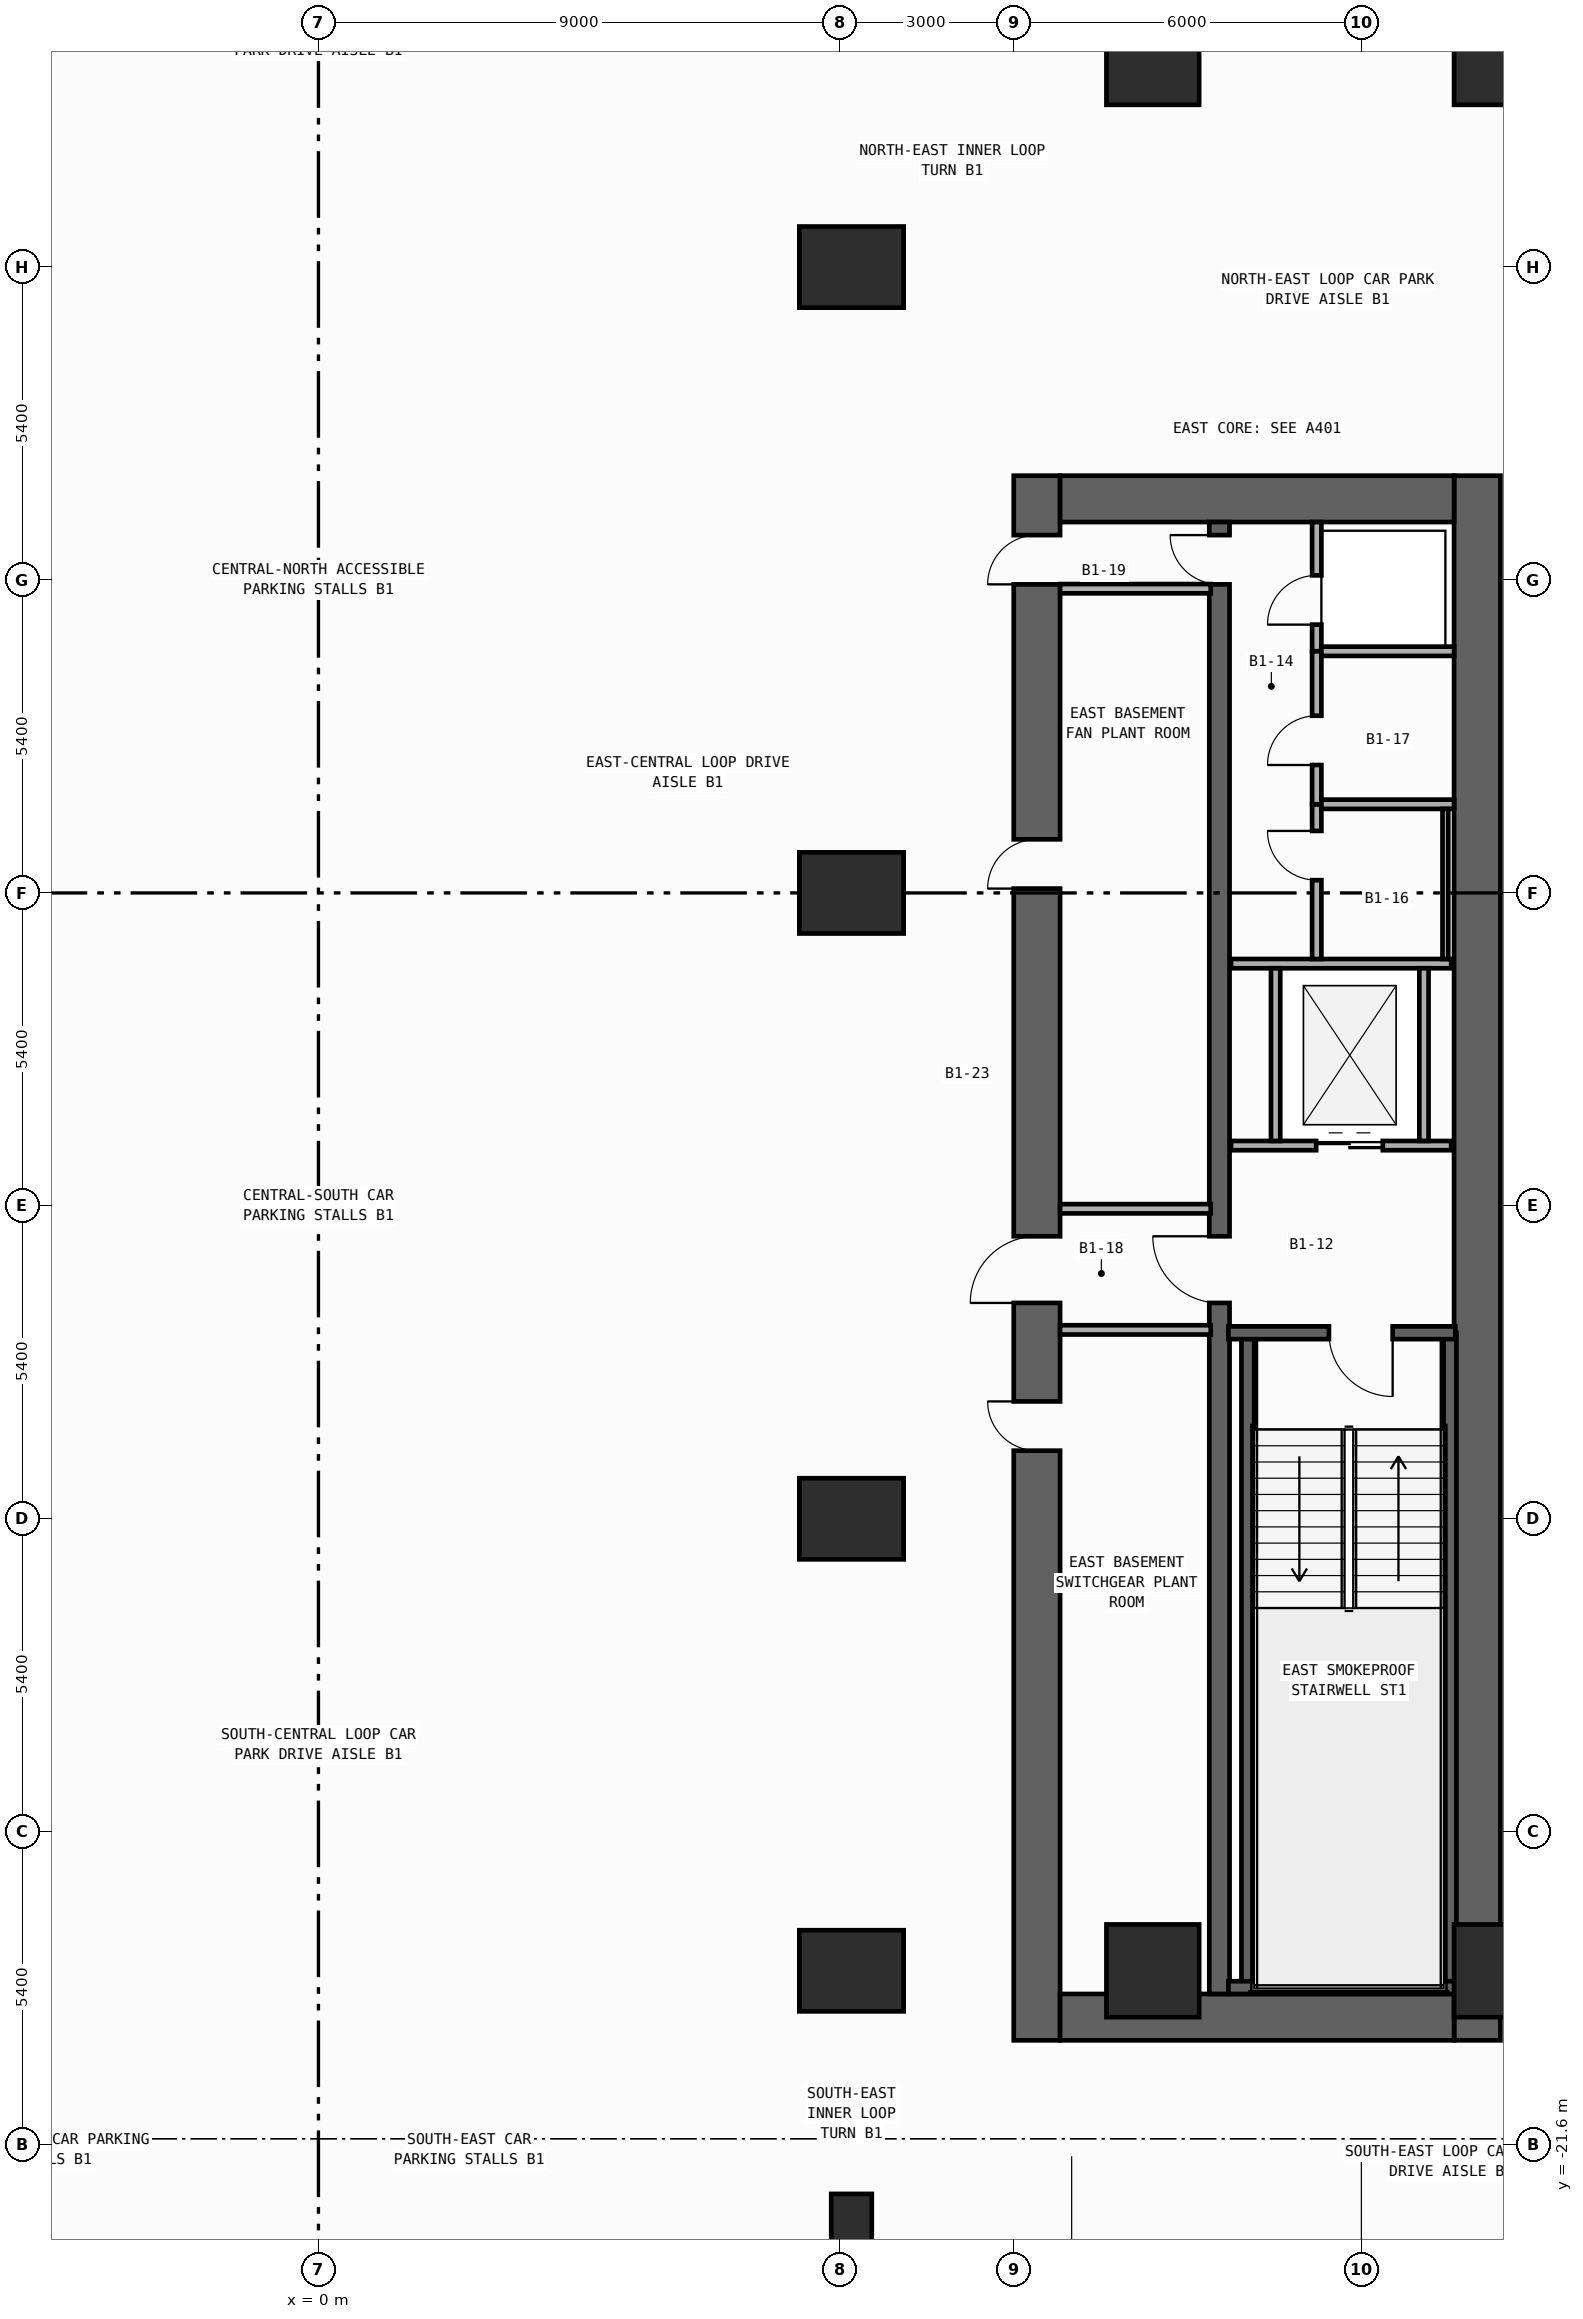
"""IFC4 building model, lengths in metres.
Left out: names, types, materials, properties, quantities, classifications, styles, units other than length and angle.
Written with IfcOpenShell. Run it as: python <this file> out.ifc"""

import sys

from ifc_helpers import new_model, si_unit, direction, frame, frame_2d, origin, origin_2d, place, context, subcontext, project, spatial, rectangle, extrude, element, fill, save


model = new_model("IFC4")
c1 = context("Model", 3, precision=1e-05, world=origin(), true_north=direction((0.0, 1.0)))
c2 = subcontext(c1, "Body", "Model", "MODEL_VIEW")
j1 = project(units=[si_unit("LENGTHUNIT", "METRE"), si_unit("PLANEANGLEUNIT", "RADIAN")], contexts=[c1])
p1 = place(None, origin())
s1 = spatial("IfcSite", under=j1, at=p1, CompositionType="ELEMENT")
p2 = place(p1, origin())
s2 = spatial("IfcBuilding", under=s1, at=p2, CompositionType="ELEMENT")
p3 = place(p2, frame((0.0, 0.0, -4.5)))
s3 = spatial("IfcBuildingStorey", under=s2, at=p3, CompositionType="ELEMENT", Elevation=-4.5)
p4 = place(p3, frame((12.4, -19.8, 0.0), z_axis=(0.0, 0.0, 1.0), x_axis=(0.0, 1.0, 0.0)))
e1 = element("IfcWall", 1, at=p4, inside=s3, PredefinedType="SHEAR", context=c2, shape_type="SweptSolid", body=[
    extrude(rectangle(XDim=27.0, YDim=0.8, at=frame_2d((13.5, 0.0))), origin(), (0.0, 0.0, 1.0), 4.2),
])
p5 = place(p4, frame((19.875, 0.0, 0.0)))
e2 = element("IfcOpeningElement", 2, at=p5, cuts=e1, PredefinedType="OPENING", context=c2, shape_type="SweptSolid", body=[
    extrude(rectangle(XDim=0.85, YDim=2.1, at=frame_2d((0.425, 1.05))), frame((0.0, 0.41, 0.0), z_axis=(0.0, -1.0, 0.0), x_axis=(1.0, 0.0, 0.0)), (0.0, 0.0, 1.0), 0.82),
])
p6 = place(p4, frame((10.175, 0.0, 0.0)))
e3 = element("IfcOpeningElement", 3, at=p6, cuts=e1, PredefinedType="OPENING", context=c2, shape_type="SweptSolid", body=[
    extrude(rectangle(XDim=0.85, YDim=2.1, at=frame_2d((0.425, 1.05))), frame((0.0, 0.41, 0.0), z_axis=(0.0, -1.0, 0.0), x_axis=(1.0, 0.0, 0.0)), (0.0, 0.0, 1.0), 0.82),
])
p7 = place(p4, frame((12.725, 0.0, 0.0)))
e4 = element("IfcOpeningElement", 4, at=p7, cuts=e1, PredefinedType="OPENING", context=c2, shape_type="SweptSolid", body=[
    extrude(rectangle(XDim=1.15, YDim=2.2, at=frame_2d((0.575, 1.1))), frame((0.0, 0.41, 0.0), z_axis=(0.0, -1.0, 0.0), x_axis=(1.0, 0.0, 0.0)), (0.0, 0.0, 1.0), 0.82),
])
p8 = place(p4, frame((25.125, 0.0, 0.0)))
e5 = element("IfcOpeningElement", 5, at=p8, cuts=e1, PredefinedType="OPENING", context=c2, shape_type="SweptSolid", body=[
    extrude(rectangle(XDim=0.85, YDim=2.1, at=frame_2d((0.425, 1.05))), frame((0.0, 0.41, 0.0), z_axis=(0.0, -1.0, 0.0), x_axis=(1.0, 0.0, 0.0)), (0.0, 0.0, 1.0), 0.82),
])
p9 = place(p3, frame((20.0, -19.8, 0.0), z_axis=(0.0, 0.0, 1.0), x_axis=(0.0, 1.0, 0.0)))
e6 = element("IfcWall", 6, at=p9, inside=s3, PredefinedType="SHEAR", context=c2, shape_type="SweptSolid", body=[
    extrude(rectangle(XDim=27.0, YDim=0.8, at=frame_2d((13.5, 0.0))), origin(), (0.0, 0.0, 1.0), 4.2),
])
for number, where, z_axis, x_axis in (
    (7, (12.8, -19.4, 0.0), (0.0, 0.0, 1.0), (1.0, 0.0, 0.0)),
    (8, (12.8, 6.8, 0.0), (0.0, 0.0, 1.0), (1.0, 0.0, 0.0)),
):
    element("IfcWall", number, at=place(p3, frame(where, z_axis=z_axis, x_axis=x_axis)), inside=s3, PredefinedType="SHEAR", context=c2, shape_type="SweptSolid", body=[
        extrude(rectangle(XDim=6.8, YDim=0.8, at=frame_2d((3.4, 0.0))), origin(), (0.0, 0.0, 1.0), 4.2),
    ])
p10 = place(p3, frame((15.55, -19.0, 0.0), z_axis=(0.0, 0.0, 1.0), x_axis=(0.0, 1.0, 0.0)))
e9 = element("IfcWall", 9, at=p10, inside=s3, PredefinedType="SHEAR", context=c2, shape_type="SweptSolid", body=[
    extrude(rectangle(XDim=25.4, YDim=0.35, at=frame_2d((12.7, 0.0))), origin(), (0.0, 0.0, 1.0), 4.2),
])
p11 = place(p10, frame((11.925, 0.0, 0.0)))
e10 = element("IfcOpeningElement", 10, at=p11, cuts=e9, PredefinedType="OPENING", context=c2, shape_type="SweptSolid", body=[
    extrude(rectangle(XDim=1.15, YDim=2.2, at=frame_2d((0.575, 1.1))), frame((0.0, 0.185, 0.0), z_axis=(0.0, -1.0, 0.0), x_axis=(1.0, 0.0, 0.0)), (0.0, 0.0, 1.0), 0.37),
])
p12 = place(p10, frame((24.325, 0.0, 0.0)))
e11 = element("IfcOpeningElement", 11, at=p12, cuts=e9, PredefinedType="OPENING", context=c2, shape_type="SweptSolid", body=[
    extrude(rectangle(XDim=0.85, YDim=2.1, at=frame_2d((0.425, 1.05))), frame((0.0, 0.185, 0.0), z_axis=(0.0, -1.0, 0.0), x_axis=(1.0, 0.0, 0.0)), (0.0, 0.0, 1.0), 0.37),
])
for number, where, z_axis, x_axis in (
    (12, (16.04, -18.89, 0.0), (0.0, 0.0, 1.0), (0.0, 1.0, 0.0)),
    (13, (19.53, -18.89, 0.0), (0.0, 0.0, 1.0), (0.0, 1.0, 0.0)),
):
    element("IfcWall", number, at=place(p3, frame(where, z_axis=z_axis, x_axis=x_axis)), inside=s3, PredefinedType="SHEAR", context=c2, shape_type="SweptSolid", body=[
        extrude(rectangle(XDim=11.3, YDim=0.22, at=frame_2d((5.65, 0.0))), origin(), (0.0, 0.0, 1.0), 4.2),
    ])
p13 = place(p3, frame((15.705, -18.89, 0.0), z_axis=(0.0, 0.0, 1.0), x_axis=(1.0, 0.0, 0.0)))
e14 = element("IfcWall", 14, at=p13, inside=s3, PredefinedType="SHEAR", context=c2, shape_type="SweptSolid", body=[
    extrude(rectangle(XDim=3.915, YDim=0.22, at=frame_2d((1.958, 0.0))), origin(), (0.0, 0.0, 1.0), 4.2),
])
p14 = place(p3, frame((19.62, -7.59, 0.0), z_axis=(0.0, 0.0, 1.0), x_axis=(-1.0, 0.0, 0.0)))
e15 = element("IfcWall", 15, at=p14, inside=s3, PredefinedType="SHEAR", context=c2, shape_type="SweptSolid", body=[
    extrude(rectangle(XDim=3.915, YDim=0.22, at=frame_2d((1.958, 0.0))), origin(), (0.0, 0.0, 1.0), 4.2),
])
p15 = place(p14, frame((1.08, 0.0, 0.0)))
e16 = element("IfcOpeningElement", 16, at=p15, cuts=e15, PredefinedType="OPENING", context=c2, shape_type="SweptSolid", body=[
    extrude(rectangle(XDim=1.1, YDim=2.2, at=frame_2d((0.55, 1.1))), frame((0.0, 0.12, 0.0), z_axis=(0.0, -1.0, 0.0), x_axis=(1.0, 0.0, 0.0)), (0.0, 0.0, 1.0), 0.24),
])
for number, where, z_axis, x_axis in (
    (17, (9.2, -18.6, 0.0), (0.0, 0.0, 1.0), (1.0, 0.0, 0.0)),
    (18, (9.2, -10.8, 0.0), (0.0, 0.0, 1.0), (1.0, 0.0, 0.0)),
    (19, (9.2, 0.0, 0.0), (0.0, 0.0, 1.0), (1.0, 0.0, 0.0)),
    (20, (9.2, 10.8, 0.0), (0.0, 0.0, 1.0), (1.0, 0.0, 0.0)),
):
    element("IfcColumn", number, at=place(p3, frame(where, z_axis=z_axis, x_axis=x_axis)), inside=s3, PredefinedType="COLUMN", context=c2, shape_type="SweptSolid", body=[
        extrude(rectangle(XDim=1.8, YDim=1.4, at=origin_2d()), origin(), (0.0, 0.0, 1.0), 4.5),
    ])
for number, where, z_axis, x_axis in (
    (21, (20.4, -18.6, 0.0), (0.0, 0.0, 1.0), (1.0, 0.0, 0.0)),
    (22, (20.4, 14.4, 0.0), (0.0, 0.0, 1.0), (1.0, 0.0, 0.0)),
    (23, (14.4, -18.6, 0.0), (0.0, 0.0, 1.0), (1.0, 0.0, 0.0)),
    (24, (14.4, 14.4, 0.0), (0.0, 0.0, 1.0), (1.0, 0.0, 0.0)),
):
    element("IfcColumn", number, at=place(p3, frame(where, z_axis=z_axis, x_axis=x_axis)), inside=s3, PredefinedType="COLUMN", context=c2, shape_type="SweptSolid", body=[
        extrude(rectangle(XDim=1.6, YDim=1.6, at=origin_2d()), origin(), (0.0, 0.0, 1.0), 4.5),
    ])
p16 = place(p3, frame((9.2, -23.0, 0.0), z_axis=(0.0, 0.0, 1.0), x_axis=(1.0, 0.0, 0.0)))
e25 = element("IfcColumn", 25, at=p16, inside=s3, PredefinedType="PILASTER", context=c2, shape_type="SweptSolid", body=[
    extrude(rectangle(XDim=0.7, YDim=1.1, at=origin_2d()), origin(), (0.0, 0.0, 1.0), 4.5),
])
p17 = place(p3, frame((15.75, -4.36, 0.0), z_axis=(0.0, 0.0, 1.0), x_axis=(1.0, 0.0, 0.0)))
e26 = element("IfcWall", 26, at=p17, inside=s3, PredefinedType="STANDARD", context=c2, shape_type="SweptSolid", body=[
    extrude(rectangle(XDim=3.8, YDim=0.16, at=frame_2d((1.9, 0.0))), origin(), (0.0, 0.0, 1.0), 4.2),
])
p18 = place(p17, frame((1.47, 0.0, 0.0)))
e27 = element("IfcOpeningElement", 27, at=p18, cuts=e26, PredefinedType="OPENING", context=c2, shape_type="SweptSolid", body=[
    extrude(rectangle(XDim=1.15, YDim=2.2, at=frame_2d((0.575, 1.1))), frame((0.0, 0.09, 0.0), z_axis=(0.0, -1.0, 0.0), x_axis=(1.0, 0.0, 0.0)), (0.0, 0.0, 1.0), 0.18),
])
p19 = place(p3, frame((15.75, -1.22, 0.0), z_axis=(0.0, 0.0, 1.0), x_axis=(1.0, 0.0, 0.0)))
e28 = element("IfcWall", 28, at=p19, inside=s3, PredefinedType="STANDARD", context=c2, shape_type="SweptSolid", body=[
    extrude(rectangle(XDim=3.8, YDim=0.16, at=frame_2d((1.9, 0.0))), origin(), (0.0, 0.0, 1.0), 4.2),
])
for number, where, z_axis, x_axis in (
    (29, (16.52, -4.28, 0.0), (0.0, 0.0, 1.0), (0.0, 1.0, 0.0)),
    (30, (19.08, -4.28, 0.0), (0.0, 0.0, 1.0), (0.0, 1.0, 0.0)),
):
    element("IfcWall", number, at=place(p3, frame(where, z_axis=z_axis, x_axis=x_axis)), inside=s3, PredefinedType="STANDARD", context=c2, shape_type="SweptSolid", body=[
        extrude(rectangle(XDim=2.98, YDim=0.16, at=frame_2d((1.49, 0.0))), origin(), (0.0, 0.0, 1.0), 4.2),
    ])
for number, where, z_axis, x_axis in (
    (31, (12.8, -5.45, 0.0), (0.0, 0.0, 1.0), (1.0, 0.0, 0.0)),
    (32, (12.8, -7.54, 0.0), (0.0, 0.0, 1.0), (1.0, 0.0, 0.0)),
    (33, (12.8, 5.25, 0.0), (0.0, 0.0, 1.0), (1.0, 0.0, 0.0)),
):
    element("IfcWall", number, at=place(p3, frame(where, z_axis=z_axis, x_axis=x_axis)), inside=s3, PredefinedType="STANDARD", context=c2, shape_type="SweptSolid", body=[
        extrude(rectangle(XDim=2.6, YDim=0.16, at=frame_2d((1.3, 0.0))), origin(), (0.0, 0.0, 1.0), 4.2),
    ])
p20 = place(p3, frame((17.23, 4.17, 0.0), z_axis=(0.0, 0.0, 1.0), x_axis=(0.0, 1.0, 0.0)))
e34 = element("IfcWall", 34, at=p20, inside=s3, PredefinedType="PARTITIONING", context=c2, shape_type="SweptSolid", body=[
    extrude(rectangle(XDim=2.23, YDim=0.16, at=frame_2d((1.115, 0.0))), origin(), (0.0, 0.0, 1.0), 4.2),
])
p21 = place(p20, frame((0.46, 0.0, 0.0)))
e35 = element("IfcOpeningElement", 35, at=p21, cuts=e34, PredefinedType="OPENING", context=c2, shape_type="SweptSolid", body=[
    extrude(rectangle(XDim=0.85, YDim=2.1, at=frame_2d((0.425, 1.05))), frame((0.0, 0.09, 0.0), z_axis=(0.0, -1.0, 0.0), x_axis=(1.0, 0.0, 0.0)), (0.0, 0.0, 1.0), 0.18),
])
p22 = place(p3, frame((17.23, -1.14, 0.0), z_axis=(0.0, 0.0, 1.0), x_axis=(0.0, 1.0, 0.0)))
e36 = element("IfcWall", 36, at=p22, inside=s3, PredefinedType="PARTITIONING", context=c2, shape_type="SweptSolid", body=[
    extrude(rectangle(XDim=2.67, YDim=0.16, at=frame_2d((1.335, 0.0))), origin(), (0.0, 0.0, 1.0), 4.2),
])
p23 = place(p22, frame((1.36, 0.0, 0.0)))
e37 = element("IfcOpeningElement", 37, at=p23, cuts=e36, PredefinedType="OPENING", context=c2, shape_type="SweptSolid", body=[
    extrude(rectangle(XDim=0.85, YDim=2.1, at=frame_2d((0.425, 1.05))), frame((0.0, 0.09, 0.0), z_axis=(0.0, -1.0, 0.0), x_axis=(1.0, 0.0, 0.0)), (0.0, 0.0, 1.0), 0.18),
])
p24 = place(p3, frame((17.23, 1.53, 0.0), z_axis=(0.0, 0.0, 1.0), x_axis=(0.0, 1.0, 0.0)))
e38 = element("IfcWall", 38, at=p24, inside=s3, PredefinedType="PARTITIONING", context=c2, shape_type="SweptSolid", body=[
    extrude(rectangle(XDim=2.64, YDim=0.16, at=frame_2d((1.32, 0.0))), origin(), (0.0, 0.0, 1.0), 4.2),
])
p25 = place(p24, frame((0.677, 0.0, 0.0)))
e39 = element("IfcOpeningElement", 39, at=p25, cuts=e38, PredefinedType="OPENING", context=c2, shape_type="SweptSolid", body=[
    extrude(rectangle(XDim=0.85, YDim=2.1, at=frame_2d((0.425, 1.05))), frame((0.0, 0.09, 0.0), z_axis=(0.0, -1.0, 0.0), x_axis=(1.0, 0.0, 0.0)), (0.0, 0.0, 1.0), 0.18),
])
for number, where, z_axis, x_axis in (
    (40, (17.31, 4.17, 0.0), (0.0, 0.0, 1.0), (1.0, 0.0, 0.0)),
    (41, (17.31, 1.53, 0.0), (0.0, 0.0, 1.0), (1.0, 0.0, 0.0)),
):
    element("IfcWall", number, at=place(p3, frame(where, z_axis=z_axis, x_axis=x_axis)), inside=s3, PredefinedType="PARTITIONING", context=c2, shape_type="SweptSolid", body=[
        extrude(rectangle(XDim=2.29, YDim=0.16, at=frame_2d((1.145, 0.0))), origin(), (0.0, 0.0, 1.0), 4.2),
    ])
p26 = place(p3, frame((19.45, 1.45, 0.0), z_axis=(0.0, 0.0, 1.0), x_axis=(0.0, -1.0, 0.0)))
e42 = element("IfcWall", 42, at=p26, inside=s3, PredefinedType="PARTITIONING", context=c2, shape_type="SweptSolid", body=[
    extrude(rectangle(XDim=2.59, YDim=0.1, at=frame_2d((1.295, 0.0))), origin(), (0.0, 0.0, 1.0), 4.2),
])
p27 = place(p15, origin())
e43 = element("IfcDoor", 43, at=p27, inside=s3, OperationType="SINGLE_SWING_LEFT", PredefinedType="DOOR", context=c2, shape_type="SweptSolid", body=[
    extrude(rectangle(XDim=1.1, YDim=2.2, at=frame_2d((0.55, 1.1))), frame((0.0, 0.025, 0.0), z_axis=(0.0, -1.0, 0.0), x_axis=(1.0, 0.0, 0.0)), (0.0, 0.0, 1.0), 0.05),
])
fill(e16, e43)
p28 = place(p5, origin())
e44 = element("IfcDoor", 44, at=p28, inside=s3, OperationType="SINGLE_SWING_LEFT", PredefinedType="DOOR", context=c2, shape_type="SweptSolid", body=[
    extrude(rectangle(XDim=0.85, YDim=2.1, at=frame_2d((0.425, 1.05))), frame((0.0, 0.025, 0.0), z_axis=(0.0, -1.0, 0.0), x_axis=(1.0, 0.0, 0.0)), (0.0, 0.0, 1.0), 0.05),
])
fill(e2, e44)
p29 = place(p6, origin())
e45 = element("IfcDoor", 45, at=p29, inside=s3, OperationType="SINGLE_SWING_RIGHT", PredefinedType="DOOR", context=c2, shape_type="SweptSolid", body=[
    extrude(rectangle(XDim=0.85, YDim=2.1, at=frame_2d((0.425, 1.05))), frame((0.0, 0.025, 0.0), z_axis=(0.0, -1.0, 0.0), x_axis=(1.0, 0.0, 0.0)), (0.0, 0.0, 1.0), 0.05),
])
fill(e3, e45)
p30 = place(p7, origin())
e46 = element("IfcDoor", 46, at=p30, inside=s3, OperationType="SINGLE_SWING_LEFT", PredefinedType="DOOR", context=c2, shape_type="SweptSolid", body=[
    extrude(rectangle(XDim=1.15, YDim=2.2, at=frame_2d((0.575, 1.1))), frame((0.0, 0.025, 0.0), z_axis=(0.0, -1.0, 0.0), x_axis=(1.0, 0.0, 0.0)), (0.0, 0.0, 1.0), 0.05),
])
fill(e4, e46)
p31 = place(p11, origin())
e47 = element("IfcDoor", 47, at=p31, inside=s3, OperationType="SINGLE_SWING_RIGHT", PredefinedType="DOOR", context=c2, shape_type="SweptSolid", body=[
    extrude(rectangle(XDim=1.15, YDim=2.2, at=frame_2d((0.575, 1.1))), frame((0.0, 0.025, 0.0), z_axis=(0.0, -1.0, 0.0), x_axis=(1.0, 0.0, 0.0)), (0.0, 0.0, 1.0), 0.05),
])
fill(e10, e47)
p32 = place(p8, origin())
e48 = element("IfcDoor", 48, at=p32, inside=s3, OperationType="SINGLE_SWING_LEFT", PredefinedType="DOOR", context=c2, shape_type="SweptSolid", body=[
    extrude(rectangle(XDim=0.85, YDim=2.1, at=frame_2d((0.425, 1.05))), frame((0.0, 0.025, 0.0), z_axis=(0.0, -1.0, 0.0), x_axis=(1.0, 0.0, 0.0)), (0.0, 0.0, 1.0), 0.05),
])
fill(e5, e48)
p33 = place(p12, origin())
e49 = element("IfcDoor", 49, at=p33, inside=s3, OperationType="SINGLE_SWING_RIGHT", PredefinedType="DOOR", context=c2, shape_type="SweptSolid", body=[
    extrude(rectangle(XDim=0.85, YDim=2.1, at=frame_2d((0.425, 1.05))), frame((0.0, 0.025, 0.0), z_axis=(0.0, -1.0, 0.0), x_axis=(1.0, 0.0, 0.0)), (0.0, 0.0, 1.0), 0.05),
])
fill(e11, e49)
p34 = place(p18, origin())
e50 = element("IfcDoor", 50, at=p34, inside=s3, OperationType="DOUBLE_DOOR_SLIDING", PredefinedType="DOOR", context=c2, shape_type="SweptSolid", body=[
    extrude(rectangle(XDim=1.15, YDim=2.2, at=frame_2d((0.575, 1.1))), frame((0.0, 0.025, 0.0), z_axis=(0.0, -1.0, 0.0), x_axis=(1.0, 0.0, 0.0)), (0.0, 0.0, 1.0), 0.05),
])
fill(e27, e50)
p35 = place(p21, origin())
e51 = element("IfcDoor", 51, at=p35, inside=s3, OperationType="SINGLE_SWING_LEFT", PredefinedType="DOOR", context=c2, shape_type="SweptSolid", body=[
    extrude(rectangle(XDim=0.85, YDim=2.1, at=frame_2d((0.425, 1.05))), frame((0.0, 0.025, 0.0), z_axis=(0.0, -1.0, 0.0), x_axis=(1.0, 0.0, 0.0)), (0.0, 0.0, 1.0), 0.05),
])
fill(e35, e51)
p36 = place(p23, origin())
e52 = element("IfcDoor", 52, at=p36, inside=s3, OperationType="SINGLE_SWING_RIGHT", PredefinedType="DOOR", context=c2, shape_type="SweptSolid", body=[
    extrude(rectangle(XDim=0.85, YDim=2.1, at=frame_2d((0.425, 1.05))), frame((0.0, 0.025, 0.0), z_axis=(0.0, -1.0, 0.0), x_axis=(1.0, 0.0, 0.0)), (0.0, 0.0, 1.0), 0.05),
])
fill(e37, e52)
p37 = place(p25, origin())
e53 = element("IfcDoor", 53, at=p37, inside=s3, OperationType="SINGLE_SWING_LEFT", PredefinedType="DOOR", context=c2, shape_type="SweptSolid", body=[
    extrude(rectangle(XDim=0.85, YDim=2.1, at=frame_2d((0.425, 1.05))), frame((0.0, 0.025, 0.0), z_axis=(0.0, -1.0, 0.0), x_axis=(1.0, 0.0, 0.0)), (0.0, 0.0, 1.0), 0.05),
])
fill(e39, e53)
save(model, sys.argv[1])
